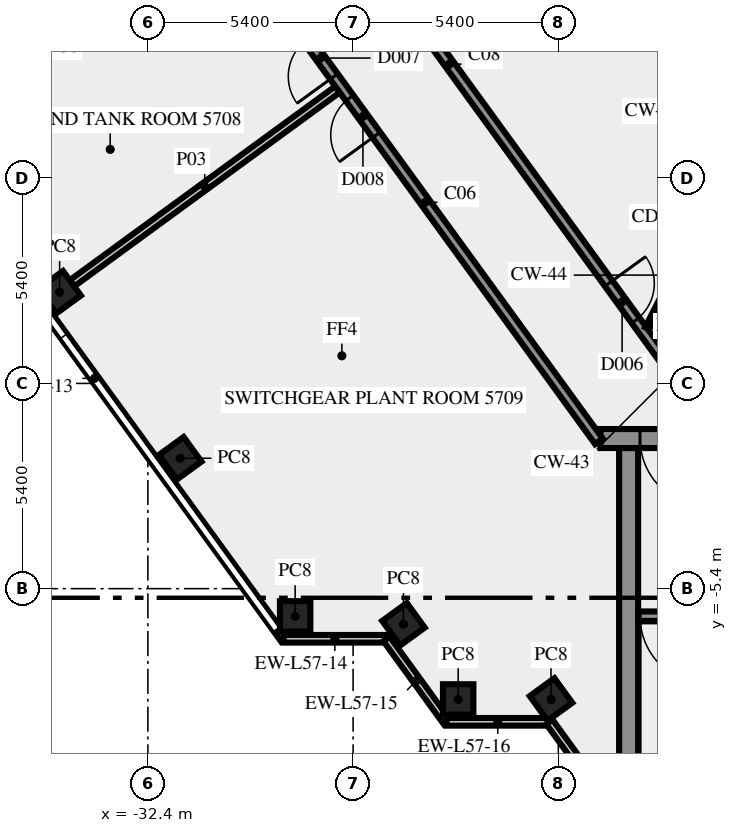
"""IFC4 building model, lengths in metres.
Left out: names, types, materials, properties, quantities, classifications, styles, units other than length and angle.
Written with IfcOpenShell. Run it as: python <this file> out.ifc"""

import sys

from ifc_helpers import new_model, si_unit, direction, frame, frame_2d, origin, origin_2d, place, context, subcontext, project, spatial, rectangle, extrude, element, fill, save


model = new_model("IFC4")
c1 = context("Model", 3, precision=1e-05, world=origin(), true_north=direction((0.0, 1.0)))
c2 = subcontext(c1, "Body", "Model", "MODEL_VIEW")
j1 = project(units=[si_unit("LENGTHUNIT", "METRE"), si_unit("PLANEANGLEUNIT", "RADIAN")], contexts=[c1])
p1 = place(None, origin())
s1 = spatial("IfcSite", under=j1, at=p1, CompositionType="ELEMENT")
p2 = place(p1, origin())
s2 = spatial("IfcBuilding", under=s1, at=p2, CompositionType="ELEMENT")
p3 = place(p2, frame((0.0, 0.0, 242.0)))
s3 = spatial("IfcBuildingStorey", under=s2, at=p3, CompositionType="ELEMENT", Elevation=242.0)
for number, where, z_axis, x_axis in (
    (1, (-34.722, 2.4, 0.0), (0.0, 0.0, 1.0), (0.588, -0.809, 0.0)),
    (2, (-31.548, -1.969, 0.0), (0.0, 0.0, 1.0), (0.588, -0.809, 0.0)),
    (3, (-28.525, -6.13, 0.0), (0.0, 0.0, 1.0), (1.0, 0.0, 0.0)),
    (4, (-25.674, -6.337, 0.0), (0.0, 0.0, 1.0), (0.588, -0.809, 0.0)),
    (5, (-24.235, -8.315, 0.0), (0.0, 0.0, 1.0), (1.0, 0.0, 0.0)),
    (6, (-21.792, -8.315, 0.0), (0.0, 0.0, 1.0), (0.588, -0.809, 0.0)),
):
    element("IfcColumn", number, at=place(p3, frame(where, z_axis=z_axis, x_axis=x_axis)), inside=s3, PredefinedType="COLUMN", context=c2, shape_type="SweptSolid", body=[
        extrude(rectangle(XDim=0.8, YDim=0.8, at=origin_2d()), origin(), (0.0, 0.0, 1.0), 5.6),
    ])
p4 = place(p3, frame((-38.786, 6.993, 0.0), z_axis=(0.0, 0.0, 1.0), x_axis=(0.587789790223, -0.809013697356, 0.0)))
e7 = element("IfcWall", 7, at=p4, inside=s3, PredefinedType="SOLIDWALL", context=c2, shape_type="SweptSolid", body=[
    extrude(rectangle(XDim=16.956, YDim=0.2, at=frame_2d((8.478, 0.0))), origin(), (0.0, 0.0, 1.0), 5.6),
])
p5 = place(p3, frame((-28.83, -6.719, 0.0), z_axis=(0.0, 0.0, 1.0), x_axis=(1.0, 0.0, 0.0)))
e8 = element("IfcWall", 8, at=p5, inside=s3, PredefinedType="SOLIDWALL", context=c2, shape_type="SweptSolid", body=[
    extrude(rectangle(XDim=2.7, YDim=0.2, at=frame_2d((1.35, 0.0))), origin(), (0.0, 0.0, 1.0), 5.6),
])
p6 = place(p3, frame((-26.12, -6.724, 0.0), z_axis=(0.0, 0.0, 1.0), x_axis=(0.587720002413, -0.809064397168, 0.0)))
e9 = element("IfcWall", 9, at=p6, inside=s3, PredefinedType="SOLIDWALL", context=c2, shape_type="SweptSolid", body=[
    extrude(rectangle(XDim=2.7, YDim=0.2, at=frame_2d((1.35, 0.0))), origin(), (0.0, 0.0, 1.0), 5.6),
])
p7 = place(p3, frame((-24.543, -8.904, 0.0), z_axis=(0.0, 0.0, 1.0), x_axis=(1.0, 0.0, 0.0)))
e10 = element("IfcWall", 10, at=p7, inside=s3, PredefinedType="SOLIDWALL", context=c2, shape_type="SweptSolid", body=[
    extrude(rectangle(XDim=2.7, YDim=0.2, at=frame_2d((1.35, 0.0))), origin(), (0.0, 0.0, 1.0), 5.6),
])
p8 = place(p3, frame((-21.833, -8.909, 0.0), z_axis=(0.0, 0.0, 1.0), x_axis=(0.587766567315, -0.809030569476, 0.0)))
e11 = element("IfcWall", 11, at=p8, inside=s3, PredefinedType="SOLIDWALL", context=c2, shape_type="SweptSolid", body=[
    extrude(rectangle(XDim=2.688, YDim=0.2, at=frame_2d((1.344, 0.0))), origin(), (0.0, 0.0, 1.0), 5.6),
])
p9 = place(p3, frame((-19.75, -10.5, 0.0), z_axis=(0.0, 0.0, 1.0), x_axis=(0.0, 1.0, 0.0)))
e12 = element("IfcWall", 12, at=p9, inside=s3, PredefinedType="SHEAR", context=c2, shape_type="SweptSolid", body=[
    extrude(rectangle(XDim=8.8, YDim=0.5, at=frame_2d((4.4, 0.0))), origin(), (0.0, 0.0, 1.0), 5.6),
])
p10 = place(p3, frame((-11.45, -6.125, 0.0), z_axis=(0.0, 0.0, 1.0), x_axis=(-1.0, 0.0, 0.0)))
e13 = element("IfcWall", 13, at=p10, inside=s3, PredefinedType="SHEAR", context=c2, shape_type="SweptSolid", body=[
    extrude(rectangle(XDim=8.05, YDim=0.25, at=frame_2d((4.025, 0.0))), origin(), (0.0, 0.0, 1.0), 5.6),
])
p11 = place(p10, frame((6.2, 0.0, 0.0)))
e14 = element("IfcOpeningElement", 14, at=p11, cuts=e13, PredefinedType="OPENING", context=c2, shape_type="SweptSolid", body=[
    extrude(rectangle(XDim=1.8, YDim=2.1, at=frame_2d((0.9, 1.05))), frame((0.0, 0.135, 0.0), z_axis=(0.0, -1.0, 0.0), x_axis=(1.0, 0.0, 0.0)), (0.0, 0.0, 1.0), 0.27),
])
p12 = place(p3, frame((20.49, -1.45, 0.0), z_axis=(0.0, 0.0, 1.0), x_axis=(-1.0, 0.0, 0.0)))
e15 = element("IfcWall", 15, at=p12, inside=s3, PredefinedType="SHEAR", context=c2, shape_type="SweptSolid", body=[
    extrude(rectangle(XDim=40.98, YDim=0.5, at=frame_2d((20.49, 0.0))), origin(), (0.0, 0.0, 1.0), 5.6),
])
p13 = place(p12, frame((38.14, 0.0, 0.0)))
e16 = element("IfcOpeningElement", 16, at=p13, cuts=e15, PredefinedType="OPENING", context=c2, shape_type="SweptSolid", body=[
    extrude(rectangle(XDim=1.8, YDim=2.1, at=frame_2d((0.9, 1.05))), frame((0.0, 0.26, 0.0), z_axis=(0.0, -1.0, 0.0), x_axis=(1.0, 0.0, 0.0)), (0.0, 0.0, 1.0), 0.52),
])
p14 = place(p12, frame((36.728, 0.0, 0.0)))
e17 = element("IfcOpeningElement", 17, at=p14, cuts=e15, PredefinedType="OPENING", context=c2, shape_type="SweptSolid", body=[
    extrude(rectangle(XDim=0.8, YDim=2.1, at=frame_2d((0.4, 1.05))), frame((0.0, 0.26, 0.0), z_axis=(0.0, -1.0, 0.0), x_axis=(1.0, 0.0, 0.0)), (0.0, 0.0, 1.0), 0.52),
])
p15 = place(p12, frame((35.153, 0.0, 0.0)))
e18 = element("IfcOpeningElement", 18, at=p15, cuts=e15, PredefinedType="OPENING", context=c2, shape_type="SweptSolid", body=[
    extrude(rectangle(XDim=0.8, YDim=2.1, at=frame_2d((0.4, 1.05))), frame((0.0, 0.26, 0.0), z_axis=(0.0, -1.0, 0.0), x_axis=(1.0, 0.0, 0.0)), (0.0, 0.0, 1.0), 0.52),
])
p16 = place(p12, frame((32.94, 0.0, 0.0)))
e19 = element("IfcOpeningElement", 19, at=p16, cuts=e15, PredefinedType="OPENING", context=c2, shape_type="SweptSolid", body=[
    extrude(rectangle(XDim=0.9, YDim=2.1, at=frame_2d((0.45, 1.05))), frame((0.0, 0.26, 0.0), z_axis=(0.0, -1.0, 0.0), x_axis=(1.0, 0.0, 0.0)), (0.0, 0.0, 1.0), 0.52),
])
p17 = place(p12, frame((20.74, 0.0, 0.0)))
e20 = element("IfcOpeningElement", 20, at=p17, cuts=e15, PredefinedType="OPENING", context=c2, shape_type="SweptSolid", body=[
    extrude(rectangle(XDim=2.0, YDim=2.1, at=frame_2d((1.0, 1.05))), frame((0.0, 0.26, 0.0), z_axis=(0.0, -1.0, 0.0), x_axis=(1.0, 0.0, 0.0)), (0.0, 0.0, 1.0), 0.52),
])
p18 = place(p12, frame((7.14, 0.0, 0.0)))
e21 = element("IfcOpeningElement", 21, at=p18, cuts=e15, PredefinedType="OPENING", context=c2, shape_type="SweptSolid", body=[
    extrude(rectangle(XDim=0.9, YDim=2.1, at=frame_2d((0.45, 1.05))), frame((0.0, 0.26, 0.0), z_axis=(0.0, -1.0, 0.0), x_axis=(1.0, 0.0, 0.0)), (0.0, 0.0, 1.0), 0.52),
])
p19 = place(p12, frame((4.19, 0.0, 0.0)))
e22 = element("IfcOpeningElement", 22, at=p19, cuts=e15, PredefinedType="OPENING", context=c2, shape_type="SweptSolid", body=[
    extrude(rectangle(XDim=0.9, YDim=2.1, at=frame_2d((0.45, 1.05))), frame((0.0, 0.26, 0.0), z_axis=(0.0, -1.0, 0.0), x_axis=(1.0, 0.0, 0.0)), (0.0, 0.0, 1.0), 0.52),
])
p20 = place(p12, frame((1.04, 0.0, 0.0)))
e23 = element("IfcOpeningElement", 23, at=p20, cuts=e15, PredefinedType="OPENING", context=c2, shape_type="SweptSolid", body=[
    extrude(rectangle(XDim=1.8, YDim=2.1, at=frame_2d((0.9, 1.05))), frame((0.0, 0.26, 0.0), z_axis=(0.0, -1.0, 0.0), x_axis=(1.0, 0.0, 0.0)), (0.0, 0.0, 1.0), 0.52),
])
p21 = place(p3, frame((-20.531, -1.523, 0.0), z_axis=(0.0, 0.0, 1.0), x_axis=(-0.587782114023, 0.809019274452, 0.0)))
e24 = element("IfcWall", 24, at=p21, inside=s3, PredefinedType="SOLIDWALL", context=c2, shape_type="SweptSolid", body=[
    extrude(rectangle(XDim=22.212, YDim=0.25, at=frame_2d((11.106, 0.0))), origin(), (0.0, 0.0, 1.0), 5.6),
])
p22 = place(p21, frame((11.865, 0.0, 0.0)))
e25 = element("IfcOpeningElement", 25, at=p22, cuts=e24, PredefinedType="OPENING", context=c2, shape_type="SweptSolid", body=[
    extrude(rectangle(XDim=1.2, YDim=2.1, at=frame_2d((0.6, 1.05))), frame((0.0, 0.135, 0.0), z_axis=(0.0, -1.0, 0.0), x_axis=(1.0, 0.0, 0.0)), (0.0, 0.0, 1.0), 0.27),
])
p23 = place(p21, frame((9.966, 0.0, 0.0)))
e26 = element("IfcOpeningElement", 26, at=p23, cuts=e24, PredefinedType="OPENING", context=c2, shape_type="SweptSolid", body=[
    extrude(rectangle(XDim=1.2, YDim=2.1, at=frame_2d((0.6, 1.05))), frame((0.0, 0.135, 0.0), z_axis=(0.0, -1.0, 0.0), x_axis=(1.0, 0.0, 0.0)), (0.0, 0.0, 1.0), 0.27),
])
p24 = place(p3, frame((-31.387, 17.927, 0.0), z_axis=(0.0, 0.0, 1.0), x_axis=(0.587788830132, -0.80901439491, 0.0)))
e27 = element("IfcWall", 27, at=p24, inside=s3, PredefinedType="SOLIDWALL", context=c2, shape_type="SweptSolid", body=[
    extrude(rectangle(XDim=23.549, YDim=0.25, at=frame_2d((11.775, 0.0))), origin(), (0.0, 0.0, 1.0), 5.6),
])
p25 = place(p24, frame((18.907, 0.0, 0.0)))
e28 = element("IfcOpeningElement", 28, at=p25, cuts=e27, PredefinedType="OPENING", context=c2, shape_type="SweptSolid", body=[
    extrude(rectangle(XDim=1.2, YDim=2.1, at=frame_2d((0.6, 1.05))), frame((0.0, 0.135, 0.0), z_axis=(0.0, -1.0, 0.0), x_axis=(1.0, 0.0, 0.0)), (0.0, 0.0, 1.0), 0.27),
])
p26 = place(p3, frame((-34.394, 2.637, 0.0), z_axis=(0.0, 0.0, 1.0), x_axis=(0.807574266555, 0.589765889145, 0.0)))
e29 = element("IfcWall", 29, at=p26, inside=s3, PredefinedType="SOLIDWALL", context=c2, shape_type="SweptSolid", body=[
    extrude(rectangle(XDim=8.644, YDim=0.2, at=frame_2d((4.322, 0.0))), origin(), (0.0, 0.0, 1.0), 5.6),
])
p27 = place(p3, frame((-19.261, 1.45, 0.0), z_axis=(0.0, 0.0, 1.0), x_axis=(0.453950796792, 0.891026752736, 0.0)))
e30 = element("IfcWall", 30, at=p27, inside=s3, PredefinedType="PARTITIONING", context=c2, shape_type="SweptSolid", body=[
    extrude(rectangle(XDim=2.778, YDim=0.12, at=frame_2d((1.389, 0.0))), origin(), (0.0, 0.0, 1.0), 5.6),
])
p28 = place(p11, origin())
e31 = element("IfcDoor", 31, at=p28, inside=s3, OperationType="DOUBLE_DOOR_SINGLE_SWING", PredefinedType="DOOR", context=c2, shape_type="SweptSolid", body=[
    extrude(rectangle(XDim=1.8, YDim=2.1, at=frame_2d((0.9, 1.05))), frame((0.0, 0.025, 0.0), z_axis=(0.0, -1.0, 0.0), x_axis=(1.0, 0.0, 0.0)), (0.0, 0.0, 1.0), 0.05),
])
fill(e14, e31)
p29 = place(p13, origin())
e32 = element("IfcDoor", 32, at=p29, inside=s3, OperationType="DOUBLE_DOOR_SINGLE_SWING", PredefinedType="DOOR", context=c2, shape_type="SweptSolid", body=[
    extrude(rectangle(XDim=1.8, YDim=2.1, at=frame_2d((0.9, 1.05))), frame((0.0, 0.025, 0.0), z_axis=(0.0, -1.0, 0.0), x_axis=(1.0, 0.0, 0.0)), (0.0, 0.0, 1.0), 0.05),
])
fill(e16, e32)
p30 = place(p25, origin())
e33 = element("IfcDoor", 33, at=p30, inside=s3, OperationType="SINGLE_SWING_RIGHT", PredefinedType="DOOR", context=c2, shape_type="SweptSolid", body=[
    extrude(rectangle(XDim=1.2, YDim=2.1, at=frame_2d((0.6, 1.05))), frame((0.0, 0.025, 0.0), z_axis=(0.0, -1.0, 0.0), x_axis=(1.0, 0.0, 0.0)), (0.0, 0.0, 1.0), 0.05),
])
fill(e28, e33)
p31 = place(p22, origin())
e34 = element("IfcDoor", 34, at=p31, inside=s3, OperationType="SINGLE_SWING_LEFT", PredefinedType="DOOR", context=c2, shape_type="SweptSolid", body=[
    extrude(rectangle(XDim=1.2, YDim=2.1, at=frame_2d((0.6, 1.05))), frame((0.0, 0.025, 0.0), z_axis=(0.0, -1.0, 0.0), x_axis=(1.0, 0.0, 0.0)), (0.0, 0.0, 1.0), 0.05),
])
fill(e25, e34)
p32 = place(p23, origin())
e35 = element("IfcDoor", 35, at=p32, inside=s3, OperationType="SINGLE_SWING_RIGHT", PredefinedType="DOOR", context=c2, shape_type="SweptSolid", body=[
    extrude(rectangle(XDim=1.2, YDim=2.1, at=frame_2d((0.6, 1.05))), frame((0.0, 0.025, 0.0), z_axis=(0.0, -1.0, 0.0), x_axis=(1.0, 0.0, 0.0)), (0.0, 0.0, 1.0), 0.05),
])
fill(e26, e35)
save(model, sys.argv[1])
